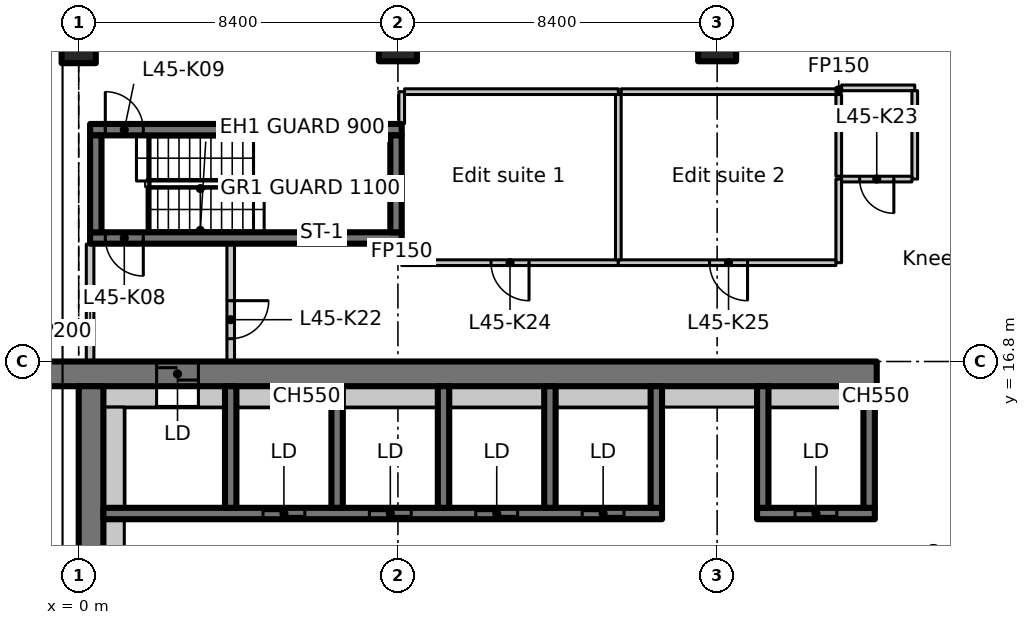
"""IFC4 building model, lengths in metres.
Left out: names, types, materials, properties, quantities, classifications, styles, units other than length and angle.
Written with IfcOpenShell. Run it as: python <this file> out.ifc"""

import sys

from ifc_helpers import new_model, si_unit, direction, frame, frame_2d, origin, origin_2d, place, context, subcontext, project, spatial, rectangle, extrude, element, fill, save


model = new_model("IFC4")
c1 = context("Model", 3, precision=1e-05, world=origin(), true_north=direction((0.0, 1.0)))
c2 = subcontext(c1, "Body", "Model", "MODEL_VIEW")
j1 = project(units=[si_unit("LENGTHUNIT", "METRE"), si_unit("PLANEANGLEUNIT", "RADIAN")], contexts=[c1])
p1 = place(None, origin())
s1 = spatial("IfcSite", under=j1, at=p1, CompositionType="ELEMENT")
p2 = place(p1, origin())
s2 = spatial("IfcBuilding", under=s1, at=p2, CompositionType="ELEMENT")
p3 = place(p2, frame((0.0, 0.0, 181.2)))
s3 = spatial("IfcBuildingStorey", under=s2, at=p3, CompositionType="ELEMENT", Elevation=181.2)
p4 = place(p3, frame((0.0, 25.2, 0.0), z_axis=(0.0, 0.0, 1.0), x_axis=(1.0, 0.0, 0.0)))
e1 = element("IfcColumn", 1, at=p4, inside=s3, PredefinedType="COLUMN", context=c2, shape_type="SweptSolid", body=[
    extrude(rectangle(XDim=0.9, YDim=1.1, at=origin_2d()), origin(), (0.0, 0.0, 1.0), 3.35),
])
for number, where, z_axis, x_axis in (
    (2, (8.4, 25.2, 0.0), (0.0, 0.0, 1.0), (1.0, 0.0, 0.0)),
    (3, (16.8, 25.2, 0.0), (0.0, 0.0, 1.0), (1.0, 0.0, 0.0)),
):
    element("IfcColumn", number, at=place(p3, frame(where, z_axis=z_axis, x_axis=x_axis)), inside=s3, PredefinedType="COLUMN", context=c2, shape_type="SweptSolid", body=[
        extrude(rectangle(XDim=1.0, YDim=1.0, at=origin_2d()), origin(), (0.0, 0.0, 1.0), 3.35),
    ])
p5 = place(p3, frame((-1.1, 16.475, 0.0), z_axis=(0.0, 0.0, 1.0), x_axis=(1.0, 0.0, 0.0)))
e4 = element("IfcWall", 4, at=p5, inside=s3, PredefinedType="SHEAR", context=c2, shape_type="SweptSolid", body=[
    extrude(rectangle(XDim=22.1, YDim=0.65, at=frame_2d((11.05, 0.0))), origin(), (0.0, 0.0, 1.0), 3.35),
])
p6 = place(p5, frame((3.15, 0.0, 0.0)))
e5 = element("IfcOpeningElement", 5, at=p6, cuts=e4, PredefinedType="OPENING", context=c2, shape_type="SweptSolid", body=[
    extrude(rectangle(XDim=1.1, YDim=2.3, at=frame_2d((0.55, 1.15))), frame((0.0, 0.335, 0.0), z_axis=(0.0, -1.0, 0.0), x_axis=(1.0, 0.0, 0.0)), (0.0, 0.0, 1.0), 0.67),
])
p7 = place(p3, frame((0.325, 7.286, 0.0), z_axis=(0.0, 0.0, 1.0), x_axis=(0.0, 1.0, 0.0)))
e6 = element("IfcWall", 6, at=p7, inside=s3, PredefinedType="SHEAR", context=c2, shape_type="SweptSolid", body=[
    extrude(rectangle(XDim=8.864, YDim=0.65, at=frame_2d((4.432, 0.0))), origin(), (0.0, 0.0, 1.0), 3.35),
])
p8 = place(p3, frame((0.65, 15.875, 0.0), z_axis=(0.0, 0.0, 1.0), x_axis=(1.0, 0.0, 0.0)))
e7 = element("IfcWall", 7, at=p8, inside=s3, PredefinedType="PARTITIONING", context=c2, shape_type="SweptSolid", body=[
    extrude(rectangle(XDim=1.4, YDim=0.55, at=frame_2d((0.7, 0.0))), origin(), (0.0, 0.0, 1.0), 3.35),
])
p9 = place(p3, frame((0.65, 12.8, 0.0), z_axis=(0.0, 0.0, 1.0), x_axis=(1.0, 0.0, 0.0)))
e8 = element("IfcWall", 8, at=p9, inside=s3, PredefinedType="SHEAR", context=c2, shape_type="SweptSolid", body=[
    extrude(rectangle(XDim=14.7, YDim=0.3, at=frame_2d((7.35, 0.0))), origin(), (0.0, 0.0, 1.0), 3.35),
])
p10 = place(p9, frame((4.2, 0.0, 0.0)))
e9 = element("IfcOpeningElement", 9, at=p10, cuts=e8, PredefinedType="OPENING", context=c2, shape_type="SweptSolid", body=[
    extrude(rectangle(XDim=1.1, YDim=2.3, at=frame_2d((0.55, 1.15))), frame((0.0, 0.16, 0.0), z_axis=(0.0, -1.0, 0.0), x_axis=(1.0, 0.0, 0.0)), (0.0, 0.0, 1.0), 0.32),
])
p11 = place(p9, frame((7.0, 0.0, 0.0)))
e10 = element("IfcOpeningElement", 10, at=p11, cuts=e8, PredefinedType="OPENING", context=c2, shape_type="SweptSolid", body=[
    extrude(rectangle(XDim=1.1, YDim=2.3, at=frame_2d((0.55, 1.15))), frame((0.0, 0.16, 0.0), z_axis=(0.0, -1.0, 0.0), x_axis=(1.0, 0.0, 0.0)), (0.0, 0.0, 1.0), 0.32),
])
p12 = place(p9, frame((9.8, 0.0, 0.0)))
e11 = element("IfcOpeningElement", 11, at=p12, cuts=e8, PredefinedType="OPENING", context=c2, shape_type="SweptSolid", body=[
    extrude(rectangle(XDim=1.1, YDim=2.3, at=frame_2d((0.55, 1.15))), frame((0.0, 0.16, 0.0), z_axis=(0.0, -1.0, 0.0), x_axis=(1.0, 0.0, 0.0)), (0.0, 0.0, 1.0), 0.32),
])
p13 = place(p9, frame((12.6, 0.0, 0.0)))
e12 = element("IfcOpeningElement", 12, at=p13, cuts=e8, PredefinedType="OPENING", context=c2, shape_type="SweptSolid", body=[
    extrude(rectangle(XDim=1.1, YDim=2.3, at=frame_2d((0.55, 1.15))), frame((0.0, 0.16, 0.0), z_axis=(0.0, -1.0, 0.0), x_axis=(1.0, 0.0, 0.0)), (0.0, 0.0, 1.0), 0.32),
])
for number, where, z_axis, x_axis in (
    (13, (4.0, 12.95, 0.0), (0.0, 0.0, 1.0), (0.0, 1.0, 0.0)),
    (14, (6.8, 12.95, 0.0), (0.0, 0.0, 1.0), (0.0, 1.0, 0.0)),
    (15, (9.6, 12.95, 0.0), (0.0, 0.0, 1.0), (0.0, 1.0, 0.0)),
    (16, (12.4, 12.95, 0.0), (0.0, 0.0, 1.0), (0.0, 1.0, 0.0)),
    (17, (15.2, 12.95, 0.0), (0.0, 0.0, 1.0), (0.0, 1.0, 0.0)),
):
    element("IfcWall", number, at=place(p3, frame(where, z_axis=z_axis, x_axis=x_axis)), inside=s3, PredefinedType="SHEAR", context=c2, shape_type="SweptSolid", body=[
        extrude(rectangle(XDim=3.2, YDim=0.3, at=frame_2d((1.6, 0.0))), origin(), (0.0, 0.0, 1.0), 3.35),
    ])
p14 = place(p3, frame((17.85, 12.8, 0.0), z_axis=(0.0, 0.0, 1.0), x_axis=(1.0, 0.0, 0.0)))
e18 = element("IfcWall", 18, at=p14, inside=s3, PredefinedType="SHEAR", context=c2, shape_type="SweptSolid", body=[
    extrude(rectangle(XDim=3.1, YDim=0.3, at=frame_2d((1.55, 0.0))), origin(), (0.0, 0.0, 1.0), 3.35),
])
p15 = place(p14, frame((1.0, 0.0, 0.0)))
e19 = element("IfcOpeningElement", 19, at=p15, cuts=e18, PredefinedType="OPENING", context=c2, shape_type="SweptSolid", body=[
    extrude(rectangle(XDim=1.1, YDim=2.3, at=frame_2d((0.55, 1.15))), frame((0.0, 0.16, 0.0), z_axis=(0.0, -1.0, 0.0), x_axis=(1.0, 0.0, 0.0)), (0.0, 0.0, 1.0), 0.32),
])
for number, where, z_axis, x_axis in (
    (20, (18.0, 12.95, 0.0), (0.0, 0.0, 1.0), (0.0, 1.0, 0.0)),
    (21, (20.8, 12.95, 0.0), (0.0, 0.0, 1.0), (0.0, 1.0, 0.0)),
):
    element("IfcWall", number, at=place(p3, frame(where, z_axis=z_axis, x_axis=x_axis)), inside=s3, PredefinedType="SHEAR", context=c2, shape_type="SweptSolid", body=[
        extrude(rectangle(XDim=3.2, YDim=0.3, at=frame_2d((1.6, 0.0))), origin(), (0.0, 0.0, 1.0), 3.35),
    ])
p16 = place(p3, frame((8.5, 20.05, 0.0), z_axis=(0.0, 0.0, 1.0), x_axis=(-1.0, 0.0, 0.0)))
e22 = element("IfcWall", 22, at=p16, inside=s3, PredefinedType="SHEAR", context=c2, shape_type="SweptSolid", body=[
    extrude(rectangle(XDim=8.2, YDim=0.3, at=frame_2d((4.1, 0.0))), origin(), (0.0, 0.0, 1.0), 3.35),
])
p17 = place(p16, frame((6.8, 0.0, 0.0)))
e23 = element("IfcOpeningElement", 23, at=p17, cuts=e22, PredefinedType="OPENING", context=c2, shape_type="SweptSolid", body=[
    extrude(rectangle(XDim=1.0, YDim=2.1, at=frame_2d((0.5, 1.05))), frame((0.0, 0.16, 0.0), z_axis=(0.0, -1.0, 0.0), x_axis=(1.0, 0.0, 0.0)), (0.0, 0.0, 1.0), 0.32),
])
p18 = place(p3, frame((0.3, 22.9, 0.0), z_axis=(0.0, 0.0, 1.0), x_axis=(1.0, 0.0, 0.0)))
e24 = element("IfcWall", 24, at=p18, inside=s3, PredefinedType="SHEAR", context=c2, shape_type="SweptSolid", body=[
    extrude(rectangle(XDim=8.2, YDim=0.3, at=frame_2d((4.1, 0.0))), origin(), (0.0, 0.0, 1.0), 3.35),
])
p19 = place(p18, frame((0.4, 0.0, 0.0)))
e25 = element("IfcOpeningElement", 25, at=p19, cuts=e24, PredefinedType="OPENING", context=c2, shape_type="SweptSolid", body=[
    extrude(rectangle(XDim=1.0, YDim=2.1, at=frame_2d((0.5, 1.05))), frame((0.0, 0.16, 0.0), z_axis=(0.0, -1.0, 0.0), x_axis=(1.0, 0.0, 0.0)), (0.0, 0.0, 1.0), 0.32),
])
for number, where, z_axis, x_axis in (
    (26, (0.45, 20.2, 0.0), (0.0, 0.0, 1.0), (0.0, 1.0, 0.0)),
    (27, (8.35, 20.2, 0.0), (0.0, 0.0, 1.0), (0.0, 1.0, 0.0)),
):
    element("IfcWall", number, at=place(p3, frame(where, z_axis=z_axis, x_axis=x_axis)), inside=s3, PredefinedType="SHEAR", context=c2, shape_type="SweptSolid", body=[
        extrude(rectangle(XDim=2.55, YDim=0.3, at=frame_2d((1.275, 0.0))), origin(), (0.0, 0.0, 1.0), 3.35),
    ])
p20 = place(p3, frame((0.3, 16.812, 0.0), z_axis=(0.0, 0.0, 1.0), x_axis=(0.0, 1.0, 0.0)))
e28 = element("IfcWall", 28, at=p20, inside=s3, PredefinedType="PARTITIONING", context=c2, shape_type="SweptSolid", body=[
    extrude(rectangle(XDim=3.076, YDim=0.2, at=frame_2d((1.538, 0.0))), origin(), (0.0, 0.0, 1.0), 2.98),
])
p21 = place(p3, frame((4.0, 19.888, 0.0), z_axis=(0.0, 0.0, 1.0), x_axis=(0.0, -1.0, 0.0)))
e29 = element("IfcWall", 29, at=p21, inside=s3, PredefinedType="PARTITIONING", context=c2, shape_type="SweptSolid", body=[
    extrude(rectangle(XDim=3.076, YDim=0.2, at=frame_2d((1.538, 0.0))), origin(), (0.0, 0.0, 1.0), 3.35),
])
p22 = place(p21, frame((1.488, 0.0, 0.0)))
e30 = element("IfcOpeningElement", 30, at=p22, cuts=e29, PredefinedType="OPENING", context=c2, shape_type="SweptSolid", body=[
    extrude(rectangle(XDim=1.0, YDim=2.1, at=frame_2d((0.5, 1.05))), frame((0.0, 0.11, 0.0), z_axis=(0.0, -1.0, 0.0), x_axis=(1.0, 0.0, 0.0)), (0.0, 0.0, 1.0), 0.22),
])
p23 = place(p3, frame((14.2, 19.4, 0.0), z_axis=(0.0, 0.0, 1.0), x_axis=(-1.0, 0.0, 0.0)))
e31 = element("IfcWall", 31, at=p23, inside=s3, PredefinedType="PARTITIONING", context=c2, shape_type="SweptSolid", body=[
    extrude(rectangle(XDim=5.7, YDim=0.15, at=frame_2d((2.85, 0.0))), origin(), (0.0, 0.0, 1.0), 3.35),
])
p24 = place(p23, frame((2.35, 0.0, 0.0)))
e32 = element("IfcOpeningElement", 32, at=p24, cuts=e31, PredefinedType="OPENING", context=c2, shape_type="SweptSolid", body=[
    extrude(rectangle(XDim=1.0, YDim=2.1, at=frame_2d((0.5, 1.05))), frame((0.0, 0.085, 0.0), z_axis=(0.0, -1.0, 0.0), x_axis=(1.0, 0.0, 0.0)), (0.0, 0.0, 1.0), 0.17),
])
p25 = place(p3, frame((8.5, 19.475, 0.0), z_axis=(0.0, 0.0, 1.0), x_axis=(0.0, 1.0, 0.0)))
e33 = element("IfcWall", 33, at=p25, inside=s3, PredefinedType="PARTITIONING", context=c2, shape_type="SweptSolid", body=[
    extrude(rectangle(XDim=0.413, YDim=0.15, at=frame_2d((0.207, 0.0))), origin(), (0.0, 0.0, 1.0), 3.35),
])
p26 = place(p3, frame((8.5, 23.062, 0.0), z_axis=(0.0, 0.0, 1.0), x_axis=(0.0, 1.0, 0.0)))
e34 = element("IfcWall", 34, at=p26, inside=s3, PredefinedType="PARTITIONING", context=c2, shape_type="SweptSolid", body=[
    extrude(rectangle(XDim=0.838, YDim=0.15, at=frame_2d((0.419, 0.0))), origin(), (0.0, 0.0, 1.0), 3.35),
])
p27 = place(p3, frame((8.575, 23.9, 0.0), z_axis=(0.0, 0.0, 1.0), x_axis=(1.0, 0.0, 0.0)))
e35 = element("IfcWall", 35, at=p27, inside=s3, PredefinedType="PARTITIONING", context=c2, shape_type="SweptSolid", body=[
    extrude(rectangle(XDim=5.625, YDim=0.15, at=frame_2d((2.812, 0.0))), origin(), (0.0, 0.0, 1.0), 3.35),
])
p28 = place(p3, frame((20.0, 21.6, 0.0), z_axis=(0.0, 0.0, 1.0), x_axis=(0.0, -1.0, 0.0)))
e36 = element("IfcWall", 36, at=p28, inside=s3, PredefinedType="PARTITIONING", context=c2, shape_type="SweptSolid", body=[
    extrude(rectangle(XDim=2.2, YDim=0.15, at=frame_2d((1.1, 0.0))), origin(), (0.0, 0.0, 1.0), 3.35),
])
p29 = place(p3, frame((19.925, 19.4, 0.0), z_axis=(0.0, 0.0, 1.0), x_axis=(-1.0, 0.0, 0.0)))
e37 = element("IfcWall", 37, at=p29, inside=s3, PredefinedType="PARTITIONING", context=c2, shape_type="SweptSolid", body=[
    extrude(rectangle(XDim=5.725, YDim=0.15, at=frame_2d((2.863, 0.0))), origin(), (0.0, 0.0, 1.0), 3.35),
])
p30 = place(p29, frame((2.325, 0.0, 0.0)))
e38 = element("IfcOpeningElement", 38, at=p30, cuts=e37, PredefinedType="OPENING", context=c2, shape_type="SweptSolid", body=[
    extrude(rectangle(XDim=1.0, YDim=2.1, at=frame_2d((0.5, 1.05))), frame((0.0, 0.085, 0.0), z_axis=(0.0, -1.0, 0.0), x_axis=(1.0, 0.0, 0.0)), (0.0, 0.0, 1.0), 0.17),
])
p31 = place(p3, frame((14.2, 23.825, 0.0), z_axis=(0.0, 0.0, 1.0), x_axis=(0.0, -1.0, 0.0)))
e39 = element("IfcWall", 39, at=p31, inside=s3, PredefinedType="PARTITIONING", context=c2, shape_type="SweptSolid", body=[
    extrude(rectangle(XDim=4.35, YDim=0.15, at=frame_2d((2.175, 0.0))), origin(), (0.0, 0.0, 1.0), 3.35),
])
p32 = place(p3, frame((14.275, 23.9, 0.0), z_axis=(0.0, 0.0, 1.0), x_axis=(1.0, 0.0, 0.0)))
e40 = element("IfcWall", 40, at=p32, inside=s3, PredefinedType="PARTITIONING", context=c2, shape_type="SweptSolid", body=[
    extrude(rectangle(XDim=5.725, YDim=0.15, at=frame_2d((2.863, 0.0))), origin(), (0.0, 0.0, 1.0), 3.35),
])
p33 = place(p3, frame((20.0, 23.9, 0.0), z_axis=(0.0, 0.0, 1.0), x_axis=(0.0, 1.0, 0.0)))
e41 = element("IfcWall", 41, at=p33, inside=s3, PredefinedType="PARTITIONING", context=c2, shape_type="SweptSolid", body=[
    extrude(rectangle(XDim=0.1, YDim=0.15, at=frame_2d((0.05, 0.0))), origin(), (0.0, 0.0, 1.0), 3.35),
])
p34 = place(p3, frame((20.075, 24.0, 0.0), z_axis=(0.0, 0.0, 1.0), x_axis=(1.0, 0.0, 0.0)))
e42 = element("IfcWall", 42, at=p34, inside=s3, PredefinedType="PARTITIONING", context=c2, shape_type="SweptSolid", body=[
    extrude(rectangle(XDim=1.925, YDim=0.15, at=frame_2d((0.962, 0.0))), origin(), (0.0, 0.0, 1.0), 3.35),
])
p35 = place(p3, frame((22.0, 23.925, 0.0), z_axis=(0.0, 0.0, 1.0), x_axis=(0.0, -1.0, 0.0)))
e43 = element("IfcWall", 43, at=p35, inside=s3, PredefinedType="PARTITIONING", context=c2, shape_type="SweptSolid", body=[
    extrude(rectangle(XDim=2.325, YDim=0.15, at=frame_2d((1.163, 0.0))), origin(), (0.0, 0.0, 1.0), 3.35),
])
p36 = place(p3, frame((21.925, 21.6, 0.0), z_axis=(0.0, 0.0, 1.0), x_axis=(-1.0, 0.0, 0.0)))
e44 = element("IfcWall", 44, at=p36, inside=s3, PredefinedType="PARTITIONING", context=c2, shape_type="SweptSolid", body=[
    extrude(rectangle(XDim=1.85, YDim=0.15, at=frame_2d((0.925, 0.0))), origin(), (0.0, 0.0, 1.0), 3.35),
])
p37 = place(p36, frame((0.475, 0.0, 0.0)))
e45 = element("IfcOpeningElement", 45, at=p37, cuts=e44, PredefinedType="OPENING", context=c2, shape_type="SweptSolid", body=[
    extrude(rectangle(XDim=0.9, YDim=2.1, at=frame_2d((0.45, 1.05))), frame((0.0, 0.085, 0.0), z_axis=(0.0, -1.0, 0.0), x_axis=(1.0, 0.0, 0.0)), (0.0, 0.0, 1.0), 0.17),
])
p38 = place(p3, frame((20.0, 21.675, 0.0), z_axis=(0.0, 0.0, 1.0), x_axis=(0.0, 1.0, 0.0)))
e46 = element("IfcWall", 46, at=p38, inside=s3, PredefinedType="PARTITIONING", context=c2, shape_type="SweptSolid", body=[
    extrude(rectangle(XDim=2.15, YDim=0.15, at=frame_2d((1.075, 0.0))), origin(), (0.0, 0.0, 1.0), 3.35),
])
p39 = place(p3, frame((0.925, 7.286, 0.0), z_axis=(0.0, 0.0, 1.0), x_axis=(0.0, 1.0, 0.0)))
e47 = element("IfcWall", 47, at=p39, inside=s3, PredefinedType="PARTITIONING", context=c2, shape_type="SweptSolid", body=[
    extrude(rectangle(XDim=5.364, YDim=0.55, at=frame_2d((2.682, 0.0))), origin(), (0.0, 0.0, 1.0), 3.35),
])
p40 = place(p3, frame((0.925, 12.95, 0.0), z_axis=(0.0, 0.0, 1.0), x_axis=(0.0, 1.0, 0.0)))
e48 = element("IfcWall", 48, at=p40, inside=s3, PredefinedType="PARTITIONING", context=c2, shape_type="SweptSolid", body=[
    extrude(rectangle(XDim=2.65, YDim=0.55, at=frame_2d((1.325, 0.0))), origin(), (0.0, 0.0, 1.0), 3.35),
])
p41 = place(p3, frame((3.15, 15.875, 0.0), z_axis=(0.0, 0.0, 1.0), x_axis=(1.0, 0.0, 0.0)))
e49 = element("IfcWall", 49, at=p41, inside=s3, PredefinedType="PARTITIONING", context=c2, shape_type="SweptSolid", body=[
    extrude(rectangle(XDim=0.7, YDim=0.55, at=frame_2d((0.35, 0.0))), origin(), (0.0, 0.0, 1.0), 3.35),
])
for number, where, z_axis, x_axis in (
    (50, (4.15, 15.875, 0.0), (0.0, 0.0, 1.0), (1.0, 0.0, 0.0)),
    (51, (6.95, 15.875, 0.0), (0.0, 0.0, 1.0), (1.0, 0.0, 0.0)),
    (52, (9.75, 15.875, 0.0), (0.0, 0.0, 1.0), (1.0, 0.0, 0.0)),
    (53, (12.55, 15.875, 0.0), (0.0, 0.0, 1.0), (1.0, 0.0, 0.0)),
    (54, (15.35, 15.875, 0.0), (0.0, 0.0, 1.0), (1.0, 0.0, 0.0)),
    (55, (18.15, 15.875, 0.0), (0.0, 0.0, 1.0), (1.0, 0.0, 0.0)),
):
    element("IfcWall", number, at=place(p3, frame(where, z_axis=z_axis, x_axis=x_axis)), inside=s3, PredefinedType="PARTITIONING", context=c2, shape_type="SweptSolid", body=[
        extrude(rectangle(XDim=2.5, YDim=0.55, at=frame_2d((1.25, 0.0))), origin(), (0.0, 0.0, 1.0), 3.35),
    ])
p42 = place(p3, frame((20.95, 15.875, 0.0), z_axis=(0.0, 0.0, 1.0), x_axis=(1.0, 0.0, 0.0)))
e56 = element("IfcWall", 56, at=p42, inside=s3, PredefinedType="PARTITIONING", context=c2, shape_type="SweptSolid", body=[
    extrude(rectangle(XDim=0.05, YDim=0.55, at=frame_2d((0.025, 0.0))), origin(), (0.0, 0.0, 1.0), 3.35),
])
p43 = place(p6, origin())
e57 = element("IfcDoor", 57, at=p43, inside=s3, OperationType="SLIDING_TO_LEFT", PredefinedType="DOOR", context=c2, shape_type="SweptSolid", body=[
    extrude(rectangle(XDim=1.1, YDim=2.3, at=frame_2d((0.55, 1.15))), frame((0.0, 0.025, 0.0), z_axis=(0.0, -1.0, 0.0), x_axis=(1.0, 0.0, 0.0)), (0.0, 0.0, 1.0), 0.05),
])
fill(e5, e57)
p44 = place(p10, origin())
e58 = element("IfcDoor", 58, at=p44, inside=s3, OperationType="SLIDING_TO_LEFT", PredefinedType="DOOR", context=c2, shape_type="SweptSolid", body=[
    extrude(rectangle(XDim=1.1, YDim=2.3, at=frame_2d((0.55, 1.15))), frame((0.0, 0.025, 0.0), z_axis=(0.0, -1.0, 0.0), x_axis=(1.0, 0.0, 0.0)), (0.0, 0.0, 1.0), 0.05),
])
fill(e9, e58)
p45 = place(p11, origin())
e59 = element("IfcDoor", 59, at=p45, inside=s3, OperationType="SLIDING_TO_LEFT", PredefinedType="DOOR", context=c2, shape_type="SweptSolid", body=[
    extrude(rectangle(XDim=1.1, YDim=2.3, at=frame_2d((0.55, 1.15))), frame((0.0, 0.025, 0.0), z_axis=(0.0, -1.0, 0.0), x_axis=(1.0, 0.0, 0.0)), (0.0, 0.0, 1.0), 0.05),
])
fill(e10, e59)
p46 = place(p12, origin())
e60 = element("IfcDoor", 60, at=p46, inside=s3, OperationType="SLIDING_TO_LEFT", PredefinedType="DOOR", context=c2, shape_type="SweptSolid", body=[
    extrude(rectangle(XDim=1.1, YDim=2.3, at=frame_2d((0.55, 1.15))), frame((0.0, 0.025, 0.0), z_axis=(0.0, -1.0, 0.0), x_axis=(1.0, 0.0, 0.0)), (0.0, 0.0, 1.0), 0.05),
])
fill(e11, e60)
p47 = place(p13, origin())
e61 = element("IfcDoor", 61, at=p47, inside=s3, OperationType="SLIDING_TO_LEFT", PredefinedType="DOOR", context=c2, shape_type="SweptSolid", body=[
    extrude(rectangle(XDim=1.1, YDim=2.3, at=frame_2d((0.55, 1.15))), frame((0.0, 0.025, 0.0), z_axis=(0.0, -1.0, 0.0), x_axis=(1.0, 0.0, 0.0)), (0.0, 0.0, 1.0), 0.05),
])
fill(e12, e61)
p48 = place(p15, origin())
e62 = element("IfcDoor", 62, at=p48, inside=s3, OperationType="SLIDING_TO_LEFT", PredefinedType="DOOR", context=c2, shape_type="SweptSolid", body=[
    extrude(rectangle(XDim=1.1, YDim=2.3, at=frame_2d((0.55, 1.15))), frame((0.0, 0.025, 0.0), z_axis=(0.0, -1.0, 0.0), x_axis=(1.0, 0.0, 0.0)), (0.0, 0.0, 1.0), 0.05),
])
fill(e19, e62)
p49 = place(p17, origin())
e63 = element("IfcDoor", 63, at=p49, inside=s3, OperationType="SINGLE_SWING_LEFT", PredefinedType="DOOR", context=c2, shape_type="SweptSolid", body=[
    extrude(rectangle(XDim=1.0, YDim=2.1, at=frame_2d((0.5, 1.05))), frame((0.0, 0.025, 0.0), z_axis=(0.0, -1.0, 0.0), x_axis=(1.0, 0.0, 0.0)), (0.0, 0.0, 1.0), 0.05),
])
fill(e23, e63)
p50 = place(p19, origin())
e64 = element("IfcDoor", 64, at=p50, inside=s3, OperationType="SINGLE_SWING_RIGHT", PredefinedType="DOOR", context=c2, shape_type="SweptSolid", body=[
    extrude(rectangle(XDim=1.0, YDim=2.1, at=frame_2d((0.5, 1.05))), frame((0.0, 0.025, 0.0), z_axis=(0.0, -1.0, 0.0), x_axis=(1.0, 0.0, 0.0)), (0.0, 0.0, 1.0), 0.05),
])
fill(e25, e64)
p51 = place(p22, origin())
e65 = element("IfcDoor", 65, at=p51, inside=s3, OperationType="SINGLE_SWING_LEFT", PredefinedType="DOOR", context=c2, shape_type="SweptSolid", body=[
    extrude(rectangle(XDim=1.0, YDim=2.1, at=frame_2d((0.5, 1.05))), frame((0.0, 0.025, 0.0), z_axis=(0.0, -1.0, 0.0), x_axis=(1.0, 0.0, 0.0)), (0.0, 0.0, 1.0), 0.05),
])
fill(e30, e65)
p52 = place(p37, origin())
e66 = element("IfcDoor", 66, at=p52, inside=s3, OperationType="SINGLE_SWING_RIGHT", PredefinedType="DOOR", context=c2, shape_type="SweptSolid", body=[
    extrude(rectangle(XDim=0.9, YDim=2.1, at=frame_2d((0.45, 1.05))), frame((0.0, 0.025, 0.0), z_axis=(0.0, -1.0, 0.0), x_axis=(1.0, 0.0, 0.0)), (0.0, 0.0, 1.0), 0.05),
])
fill(e45, e66)
p53 = place(p24, origin())
e67 = element("IfcDoor", 67, at=p53, inside=s3, OperationType="SINGLE_SWING_LEFT", PredefinedType="DOOR", context=c2, shape_type="SweptSolid", body=[
    extrude(rectangle(XDim=1.0, YDim=2.1, at=frame_2d((0.5, 1.05))), frame((0.0, 0.025, 0.0), z_axis=(0.0, -1.0, 0.0), x_axis=(1.0, 0.0, 0.0)), (0.0, 0.0, 1.0), 0.05),
])
fill(e32, e67)
p54 = place(p30, origin())
e68 = element("IfcDoor", 68, at=p54, inside=s3, OperationType="SINGLE_SWING_RIGHT", PredefinedType="DOOR", context=c2, shape_type="SweptSolid", body=[
    extrude(rectangle(XDim=1.0, YDim=2.1, at=frame_2d((0.5, 1.05))), frame((0.0, 0.025, 0.0), z_axis=(0.0, -1.0, 0.0), x_axis=(1.0, 0.0, 0.0)), (0.0, 0.0, 1.0), 0.05),
])
fill(e38, e68)
save(model, sys.argv[1])
